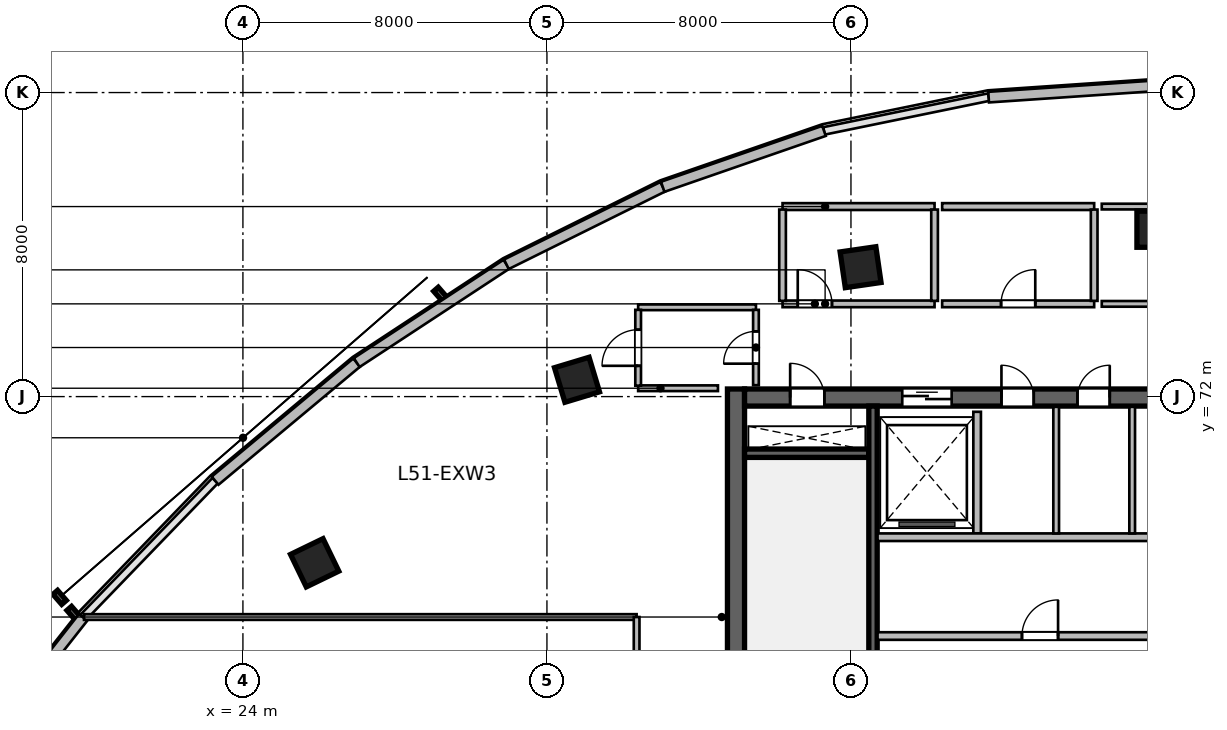
"""IFC4 building model, lengths in metres.
Left out: names, types, materials, properties, quantities, classifications, styles, units other than length and angle.
Written with IfcOpenShell. Run it as: python <this file> out.ifc"""

import sys

from ifc_helpers import new_model, si_unit, direction, frame, frame_2d, origin, origin_2d, place, context, subcontext, project, spatial, rectangle, extrude, source, transform, mapped, element, fill, save


model = new_model("IFC4")
c1 = context("Model", 3, precision=1e-05, world=origin(), true_north=direction((0.0, 1.0)))
c2 = subcontext(c1, "Body", "Model", "MODEL_VIEW")
j1 = project(units=[si_unit("LENGTHUNIT", "METRE"), si_unit("PLANEANGLEUNIT", "RADIAN")], contexts=[c1])
p1 = place(None, origin())
s1 = spatial("IfcSite", under=j1, at=p1, CompositionType="ELEMENT")
p2 = place(p1, origin())
s2 = spatial("IfcBuilding", under=s1, at=p2, CompositionType="ELEMENT")
p3 = place(p2, frame((0.0, 0.0, 211.8)))
s3 = spatial("IfcBuildingStorey", under=s2, at=p3, CompositionType="ELEMENT", Elevation=211.8)
m1 = source(origin(), c2, "Body", "SweptSolid", [
    extrude(rectangle(XDim=12.0, YDim=0.45, at=frame_2d((6.0, 0.0))), origin(), (0.0, 0.0, 1.0), 3.9),
])
p4 = place(p3, frame((36.975, 60.2, 0.0), z_axis=(0.0, 0.0, 1.0), x_axis=(0.0, 1.0, 0.0)))
e1 = element("IfcWall", 1, at=p4, inside=s3, PredefinedType="SHEAR", context=c2, shape_type="MappedRepresentation", body=[
    mapped(m1, transform((0.0, 0.0, 0.0), scale=1.0)),
])
m2 = source(origin(), c2, "Body", "SweptSolid", [
    extrude(rectangle(XDim=21.6, YDim=0.45, at=frame_2d((10.8, 0.0))), origin(), (0.0, 0.0, 1.0), 3.9),
])
p5 = place(p3, frame((37.2, 71.975, 0.0), z_axis=(0.0, 0.0, 1.0), x_axis=(1.0, 0.0, 0.0)))
e2 = element("IfcWall", 2, at=p5, inside=s3, PredefinedType="SHEAR", context=c2, shape_type="MappedRepresentation", body=[
    mapped(m2, transform((0.0, 0.0, 0.0), scale=1.0)),
])
p6 = place(p5, frame((1.2, 0.0, 0.0)))
e3 = element("IfcOpeningElement", 3, at=p6, cuts=e2, PredefinedType="OPENING", context=c2, shape_type="SweptSolid", body=[
    extrude(rectangle(XDim=0.9, YDim=2.1, at=frame_2d((0.45, 1.05))), frame((0.0, 0.235, 0.0), z_axis=(0.0, -1.0, 0.0), x_axis=(1.0, 0.0, 0.0)), (0.0, 0.0, 1.0), 0.47),
])
p7 = place(p5, frame((14.7, 0.0, 0.0)))
e4 = element("IfcOpeningElement", 4, at=p7, cuts=e2, PredefinedType="OPENING", context=c2, shape_type="SweptSolid", body=[
    extrude(rectangle(XDim=1.2, YDim=2.15, at=frame_2d((0.6, 1.075))), frame((0.0, 0.235, 0.0), z_axis=(0.0, -1.0, 0.0), x_axis=(1.0, 0.0, 0.0)), (0.0, 0.0, 1.0), 0.47),
])
p8 = place(p5, frame((4.15, 0.0, 0.0)))
e5 = element("IfcOpeningElement", 5, at=p8, cuts=e2, PredefinedType="OPENING", context=c2, shape_type="SweptSolid", body=[
    extrude(rectangle(XDim=1.3, YDim=2.15, at=frame_2d((0.65, 1.075))), frame((0.0, 0.235, 0.0), z_axis=(0.0, -1.0, 0.0), x_axis=(1.0, 0.0, 0.0)), (0.0, 0.0, 1.0), 0.47),
])
p9 = place(p5, frame((6.76, 0.0, 0.0)))
e6 = element("IfcOpeningElement", 6, at=p9, cuts=e2, PredefinedType="OPENING", context=c2, shape_type="SweptSolid", body=[
    extrude(rectangle(XDim=0.85, YDim=2.1, at=frame_2d((0.425, 1.05))), frame((0.0, 0.235, 0.0), z_axis=(0.0, -1.0, 0.0), x_axis=(1.0, 0.0, 0.0)), (0.0, 0.0, 1.0), 0.47),
])
p10 = place(p5, frame((8.76, 0.0, 0.0)))
e7 = element("IfcOpeningElement", 7, at=p10, cuts=e2, PredefinedType="OPENING", context=c2, shape_type="SweptSolid", body=[
    extrude(rectangle(XDim=0.85, YDim=2.1, at=frame_2d((0.425, 1.05))), frame((0.0, 0.235, 0.0), z_axis=(0.0, -1.0, 0.0), x_axis=(1.0, 0.0, 0.0)), (0.0, 0.0, 1.0), 0.47),
])
p11 = place(p5, frame((10.725, 0.0, 0.0)))
e8 = element("IfcOpeningElement", 8, at=p11, cuts=e2, PredefinedType="OPENING", context=c2, shape_type="SweptSolid", body=[
    extrude(rectangle(XDim=0.85, YDim=2.1, at=frame_2d((0.425, 1.05))), frame((0.0, 0.235, 0.0), z_axis=(0.0, -1.0, 0.0), x_axis=(1.0, 0.0, 0.0)), (0.0, 0.0, 1.0), 0.47),
])
m3 = source(origin(), c2, "Body", "SweptSolid", [
    extrude(rectangle(XDim=3.27, YDim=0.22, at=frame_2d((1.635, 0.0))), origin(), (0.0, 0.0, 1.0), 3.9),
])
p12 = place(p3, frame((37.2, 70.51, 0.0), z_axis=(0.0, 0.0, 1.0), x_axis=(1.0, 0.0, 0.0)))
e9 = element("IfcWall", 9, at=p12, inside=s3, PredefinedType="SHEAR", context=c2, shape_type="MappedRepresentation", body=[
    mapped(m3, transform((0.0, 0.0, 0.0), scale=1.0)),
])
m4 = source(origin(), c2, "Body", "SweptSolid", [
    extrude(rectangle(XDim=11.1, YDim=0.22, at=frame_2d((5.55, 0.0))), origin(), (0.0, 0.0, 1.0), 3.9),
])
p13 = place(p3, frame((40.58, 60.65, 0.0), z_axis=(0.0, 0.0, 1.0), x_axis=(0.0, 1.0, 0.0)))
e10 = element("IfcWall", 10, at=p13, inside=s3, PredefinedType="SHEAR", context=c2, shape_type="MappedRepresentation", body=[
    mapped(m4, transform((0.0, 0.0, 0.0), scale=1.0)),
])
m5 = source(origin(), c2, "Body", "SweptSolid", [
    extrude(rectangle(XDim=0.95, YDim=0.95, at=origin_2d()), origin(), (0.0, 0.0, 1.0), 3.9),
])
for number, where, z_axis, x_axis in (
    (11, (25.888, 67.627, 0.0), (0.0, 0.0, 1.0), (-0.436, 0.9, 0.0)),
    (12, (32.791, 72.442, 0.0), (0.0, 0.0, 1.0), (-0.289, 0.957, 0.0)),
    (13, (40.253, 75.404, 0.0), (0.0, 0.0, 1.0), (-0.143, 0.99, 0.0)),
    (14, (48.0, 76.404, 0.0), (0.0, 0.0, 1.0), (0.0, 1.0, 0.0)),
):
    element("IfcColumn", number, at=place(p3, frame(where, z_axis=z_axis, x_axis=x_axis)), inside=s3, PredefinedType="COLUMN", context=c2, shape_type="MappedRepresentation", body=[
        mapped(m5, transform((0.0, 0.0, 0.0), scale=1.0)),
    ])
m6 = source(origin(), c2, "Body", "SweptSolid", [
    extrude(rectangle(XDim=5.153, YDim=0.28, at=frame_2d((2.577, 0.0))), origin(), (0.0, 0.0, 1.0), 3.64),
])
p14 = place(p3, frame((16.609, 62.14, 0.0), z_axis=(0.0, 0.0, 1.0), x_axis=(0.618179283891, 0.786037132054, 0.0)))
e15 = element("IfcWall", 15, at=p14, inside=s3, PredefinedType="SOLIDWALL", context=c2, shape_type="MappedRepresentation", body=[
    mapped(m6, transform((0.0, 0.0, 0.0), scale=1.0)),
])
m7 = source(origin(), c2, "Body", "SweptSolid", [
    extrude(rectangle(XDim=4.852, YDim=0.28, at=frame_2d((2.426, 0.0))), origin(), (0.0, 0.0, 1.0), 3.64),
])
p15 = place(p3, frame((23.268, 69.788, 0.0), z_axis=(0.0, 0.0, 1.0), x_axis=(0.767936605821, 0.640525853843, 0.0)))
e16 = element("IfcWall", 16, at=p15, inside=s3, PredefinedType="SOLIDWALL", context=c2, shape_type="MappedRepresentation", body=[
    mapped(m7, transform((0.0, 0.0, 0.0), scale=1.0)),
])
m8 = source(origin(), c2, "Body", "SweptSolid", [
    extrude(rectangle(XDim=4.713, YDim=0.28, at=frame_2d((2.356, 0.0))), origin(), (0.0, 0.0, 1.0), 3.64),
])
p16 = place(p3, frame((26.994, 72.896, 0.0), z_axis=(0.0, 0.0, 1.0), x_axis=(0.835974386457, 0.548768462275, 0.0)))
e17 = element("IfcWall", 17, at=p16, inside=s3, PredefinedType="SOLIDWALL", context=c2, shape_type="MappedRepresentation", body=[
    mapped(m8, transform((0.0, 0.0, 0.0), scale=1.0)),
])
m9 = source(origin(), c2, "Body", "SweptSolid", [
    extrude(rectangle(XDim=4.59, YDim=0.28, at=frame_2d((2.295, 0.0))), origin(), (0.0, 0.0, 1.0), 3.64),
])
p17 = place(p3, frame((30.934, 75.482, 0.0), z_axis=(0.0, 0.0, 1.0), x_axis=(0.895974834987, 0.444104824418, 0.0)))
e18 = element("IfcWall", 18, at=p17, inside=s3, PredefinedType="SOLIDWALL", context=c2, shape_type="MappedRepresentation", body=[
    mapped(m9, transform((0.0, 0.0, 0.0), scale=1.0)),
])
m10 = source(origin(), c2, "Body", "SweptSolid", [
    extrude(rectangle(XDim=4.492, YDim=0.28, at=frame_2d((2.246, 0.0))), origin(), (0.0, 0.0, 1.0), 3.64),
])
p18 = place(p3, frame((35.046, 77.52, 0.0), z_axis=(0.0, 0.0, 1.0), x_axis=(0.944872297412, 0.32743906545, 0.0)))
e19 = element("IfcWall", 19, at=p18, inside=s3, PredefinedType="SOLIDWALL", context=c2, shape_type="MappedRepresentation", body=[
    mapped(m10, transform((0.0, 0.0, 0.0), scale=1.0)),
])
m11 = source(origin(), c2, "Body", "SweptSolid", [
    extrude(rectangle(XDim=4.387, YDim=0.28, at=frame_2d((2.193, 0.0))), origin(), (0.0, 0.0, 1.0), 3.64),
])
p19 = place(p3, frame((43.623, 79.879, 0.0), z_axis=(0.0, 0.0, 1.0), x_axis=(0.997703650546, 0.06773053733, 0.0)))
e20 = element("IfcWall", 20, at=p19, inside=s3, PredefinedType="SOLIDWALL", context=c2, shape_type="MappedRepresentation", body=[
    mapped(m11, transform((0.0, 0.0, 0.0), scale=1.0)),
])
m12 = source(origin(), c2, "Body", "SweptSolid", [
    extrude(rectangle(XDim=3.2, YDim=0.2, at=frame_2d((1.6, 0.0))), origin(), (0.0, 0.0, 1.0), 3.64),
])
p20 = place(p3, frame((43.32, 68.4, 0.0), z_axis=(0.0, 0.0, 1.0), x_axis=(0.0, 1.0, 0.0)))
e21 = element("IfcWall", 21, at=p20, inside=s3, PredefinedType="SOLIDWALL", context=c2, shape_type="MappedRepresentation", body=[
    mapped(m12, transform((0.0, 0.0, 0.0), scale=1.0)),
])
m13 = source(origin(), c2, "Body", "SweptSolid", [
    extrude(rectangle(XDim=8.8, YDim=0.2, at=frame_2d((4.4, 0.0))), origin(), (0.0, 0.0, 1.0), 3.64),
])
p21 = place(p3, frame((40.7, 68.3, 0.0), z_axis=(0.0, 0.0, 1.0), x_axis=(1.0, 0.0, 0.0)))
e22 = element("IfcWall", 22, at=p21, inside=s3, PredefinedType="SOLIDWALL", context=c2, shape_type="MappedRepresentation", body=[
    mapped(m13, transform((0.0, 0.0, 0.0), scale=1.0)),
])
m14 = source(origin(), c2, "Body", "SweptSolid", [
    extrude(rectangle(XDim=3.33, YDim=0.15, at=frame_2d((1.665, 0.0))), origin(), (0.0, 0.0, 1.0), 3.64),
])
for number, where, z_axis, x_axis in (
    (23, (45.4, 68.4, 0.0), (0.0, 0.0, 1.0), (0.0, 1.0, 0.0)),
    (24, (47.4, 68.4, 0.0), (0.0, 0.0, 1.0), (0.0, 1.0, 0.0)),
):
    element("IfcWall", number, at=place(p3, frame(where, z_axis=z_axis, x_axis=x_axis)), inside=s3, PredefinedType="PARTITIONING", context=c2, shape_type="MappedRepresentation", body=[
        mapped(m14, transform((0.0, 0.0, 0.0), scale=1.0)),
    ])
p22 = place(p3, frame((40.7, 65.7, 0.0), z_axis=(0.0, 0.0, 1.0), x_axis=(1.0, 0.0, 0.0)))
e25 = element("IfcWall", 25, at=p22, inside=s3, PredefinedType="SOLIDWALL", context=c2, shape_type="MappedRepresentation", body=[
    mapped(m13, transform((0.0, 0.0, 0.0), scale=1.0)),
])
p23 = place(p22, frame((3.8, 0.0, 0.0)))
e26 = element("IfcOpeningElement", 26, at=p23, cuts=e25, PredefinedType="OPENING", context=c2, shape_type="SweptSolid", body=[
    extrude(rectangle(XDim=0.95, YDim=2.15, at=frame_2d((0.475, 1.075))), frame((0.0, 0.11, 0.0), z_axis=(0.0, -1.0, 0.0), x_axis=(1.0, 0.0, 0.0)), (0.0, 0.0, 1.0), 0.22),
])
m15 = source(origin(), c2, "Body", "SweptSolid", [
    extrude(rectangle(XDim=2.1, YDim=0.15, at=frame_2d((1.05, 0.0))), origin(), (0.0, 0.0, 1.0), 3.64),
])
p24 = place(p3, frame((34.4, 72.22, 0.0), z_axis=(0.0, 0.0, 1.0), x_axis=(1.0, 0.0, 0.0)))
e27 = element("IfcWall", 27, at=p24, inside=s3, PredefinedType="PARTITIONING", context=c2, shape_type="MappedRepresentation", body=[
    mapped(m15, transform((0.0, 0.0, 0.0), scale=1.0)),
])
m16 = source(origin(), c2, "Body", "SweptSolid", [
    extrude(rectangle(XDim=3.1, YDim=0.15, at=frame_2d((1.55, 0.0))), origin(), (0.0, 0.0, 1.0), 3.071),
])
p25 = place(p3, frame((34.4, 74.35, 0.0), z_axis=(0.0, 0.0, 1.0), x_axis=(1.0, 0.0, 0.0)))
e28 = element("IfcWall", 28, at=p25, inside=s3, PredefinedType="PARTITIONING", context=c2, shape_type="MappedRepresentation", body=[
    mapped(m16, transform((0.0, 0.0, 0.0), scale=1.0)),
])
m17 = source(origin(), c2, "Body", "SweptSolid", [
    extrude(rectangle(XDim=1.995, YDim=0.15, at=frame_2d((0.998, 0.0))), origin(), (0.0, 0.0, 1.0), 3.64),
])
p26 = place(p3, frame((34.4, 72.288, 0.0), z_axis=(0.0, 0.0, 1.0), x_axis=(0.0, 1.0, 0.0)))
e29 = element("IfcWall", 29, at=p26, inside=s3, PredefinedType="PARTITIONING", context=c2, shape_type="MappedRepresentation", body=[
    mapped(m17, transform((0.0, 0.0, 0.0), scale=1.0)),
])
p27 = place(p26, frame((0.522, 0.0, 0.0)))
e30 = element("IfcOpeningElement", 30, at=p27, cuts=e29, PredefinedType="OPENING", context=c2, shape_type="SweptSolid", body=[
    extrude(rectangle(XDim=0.95, YDim=2.1, at=frame_2d((0.475, 1.05))), frame((0.0, 0.085, 0.0), z_axis=(0.0, -1.0, 0.0), x_axis=(1.0, 0.0, 0.0)), (0.0, 0.0, 1.0), 0.17),
])
m18 = source(origin(), c2, "Body", "SweptSolid", [
    extrude(rectangle(XDim=1.982, YDim=0.15, at=frame_2d((0.991, 0.0))), origin(), (0.0, 0.0, 1.0), 3.64),
])
p28 = place(p3, frame((37.5, 72.3, 0.0), z_axis=(0.0, 0.0, 1.0), x_axis=(0.0, 1.0, 0.0)))
e31 = element("IfcWall", 31, at=p28, inside=s3, PredefinedType="PARTITIONING", context=c2, shape_type="MappedRepresentation", body=[
    mapped(m18, transform((0.0, 0.0, 0.0), scale=1.0)),
])
p29 = place(p28, frame((0.566, 0.0, 0.0)))
e32 = element("IfcOpeningElement", 32, at=p29, cuts=e31, PredefinedType="OPENING", context=c2, shape_type="SweptSolid", body=[
    extrude(rectangle(XDim=0.85, YDim=2.1, at=frame_2d((0.425, 1.05))), frame((0.0, 0.085, 0.0), z_axis=(0.0, -1.0, 0.0), x_axis=(1.0, 0.0, 0.0)), (0.0, 0.0, 1.0), 0.17),
])
m19 = source(origin(), c2, "Body", "SweptSolid", [
    extrude(rectangle(XDim=4.0, YDim=0.175, at=frame_2d((2.0, 0.0))), origin(), (0.0, 0.0, 1.0), 3.64),
])
p30 = place(p3, frame((38.2, 74.44, 0.0), z_axis=(0.0, 0.0, 1.0), x_axis=(1.0, 0.0, 0.0)))
e33 = element("IfcWall", 33, at=p30, inside=s3, PredefinedType="PARTITIONING", context=c2, shape_type="MappedRepresentation", body=[
    mapped(m19, transform((0.0, 0.0, 0.0), scale=1.0)),
])
p31 = place(p30, frame((0.4, 0.0, 0.0)))
e34 = element("IfcOpeningElement", 34, at=p31, cuts=e33, PredefinedType="OPENING", context=c2, shape_type="SweptSolid", body=[
    extrude(rectangle(XDim=0.9, YDim=2.08, at=frame_2d((0.45, 1.04))), frame((0.0, 0.098, 0.0), z_axis=(0.0, -1.0, 0.0), x_axis=(1.0, 0.0, 0.0)), (0.0, 0.0, 1.0), 0.195),
])
m20 = source(origin(), c2, "Body", "SweptSolid", [
    extrude(rectangle(XDim=4.0, YDim=0.18, at=frame_2d((2.0, 0.0))), origin(), (0.0, 0.0, 1.0), 3.64),
])
p32 = place(p3, frame((38.2, 77.0, 0.0), z_axis=(0.0, 0.0, 1.0), x_axis=(1.0, 0.0, 0.0)))
e35 = element("IfcWall", 35, at=p32, inside=s3, PredefinedType="PLUMBINGWALL", context=c2, shape_type="MappedRepresentation", body=[
    mapped(m20, transform((0.0, 0.0, 0.0), scale=1.0)),
])
m21 = source(origin(), c2, "Body", "SweptSolid", [
    extrude(rectangle(XDim=2.403, YDim=0.175, at=frame_2d((1.201, 0.0))), origin(), (0.0, 0.0, 1.0), 3.64),
])
for number, where, z_axis, x_axis in (
    (36, (38.2, 74.519, 0.0), (0.0, 0.0, 1.0), (0.0, 1.0, 0.0)),
    (37, (42.2, 74.519, 0.0), (0.0, 0.0, 1.0), (0.0, 1.0, 0.0)),
):
    element("IfcWall", number, at=place(p3, frame(where, z_axis=z_axis, x_axis=x_axis)), inside=s3, PredefinedType="PARTITIONING", context=c2, shape_type="MappedRepresentation", body=[
        mapped(m21, transform((0.0, 0.0, 0.0), scale=1.0)),
    ])
p33 = place(p3, frame((42.4, 74.44, 0.0), z_axis=(0.0, 0.0, 1.0), x_axis=(1.0, 0.0, 0.0)))
e38 = element("IfcWall", 38, at=p33, inside=s3, PredefinedType="PARTITIONING", context=c2, shape_type="MappedRepresentation", body=[
    mapped(m19, transform((0.0, 0.0, 0.0), scale=1.0)),
])
p34 = place(p33, frame((1.55, 0.0, 0.0)))
e39 = element("IfcOpeningElement", 39, at=p34, cuts=e38, PredefinedType="OPENING", context=c2, shape_type="SweptSolid", body=[
    extrude(rectangle(XDim=0.9, YDim=2.08, at=frame_2d((0.45, 1.04))), frame((0.0, 0.098, 0.0), z_axis=(0.0, -1.0, 0.0), x_axis=(1.0, 0.0, 0.0)), (0.0, 0.0, 1.0), 0.195),
])
p35 = place(p3, frame((42.4, 77.0, 0.0), z_axis=(0.0, 0.0, 1.0), x_axis=(1.0, 0.0, 0.0)))
e40 = element("IfcWall", 40, at=p35, inside=s3, PredefinedType="PLUMBINGWALL", context=c2, shape_type="MappedRepresentation", body=[
    mapped(m20, transform((0.0, 0.0, 0.0), scale=1.0)),
])
p36 = place(p3, frame((46.4, 74.519, 0.0), z_axis=(0.0, 0.0, 1.0), x_axis=(0.0, 1.0, 0.0)))
e41 = element("IfcWall", 41, at=p36, inside=s3, PredefinedType="PARTITIONING", context=c2, shape_type="MappedRepresentation", body=[
    mapped(m21, transform((0.0, 0.0, 0.0), scale=1.0)),
])
m22 = source(origin(), c2, "Body", "SweptSolid", [
    extrude(rectangle(XDim=4.4, YDim=0.15, at=frame_2d((2.2, 0.0))), origin(), (0.0, 0.0, 1.0), 3.64),
])
p37 = place(p3, frame((46.6, 74.44, 0.0), z_axis=(0.0, 0.0, 1.0), x_axis=(1.0, 0.0, 0.0)))
e42 = element("IfcWall", 42, at=p37, inside=s3, PredefinedType="PARTITIONING", context=c2, shape_type="MappedRepresentation", body=[
    mapped(m22, transform((0.0, 0.0, 0.0), scale=1.0)),
])
p38 = place(p37, frame((1.725, 0.0, 0.0)))
e43 = element("IfcOpeningElement", 43, at=p38, cuts=e42, PredefinedType="OPENING", context=c2, shape_type="SweptSolid", body=[
    extrude(rectangle(XDim=0.95, YDim=2.1, at=frame_2d((0.475, 1.05))), frame((0.0, 0.085, 0.0), z_axis=(0.0, -1.0, 0.0), x_axis=(1.0, 0.0, 0.0)), (0.0, 0.0, 1.0), 0.17),
])
p39 = place(p3, frame((46.6, 77.0, 0.0), z_axis=(0.0, 0.0, 1.0), x_axis=(1.0, 0.0, 0.0)))
e44 = element("IfcWall", 44, at=p39, inside=s3, PredefinedType="PARTITIONING", context=c2, shape_type="MappedRepresentation", body=[
    mapped(m22, transform((0.0, 0.0, 0.0), scale=1.0)),
])
m23 = source(origin(), c2, "Body", "SweptSolid", [
    extrude(rectangle(XDim=14.542, YDim=0.15, at=frame_2d((7.271, 0.0))), origin(), (0.0, 0.0, 1.0), 3.64),
])
p40 = place(p3, frame((19.818, 66.2, 0.0), z_axis=(0.0, 0.0, 1.0), x_axis=(1.0, 0.0, 0.0)))
e45 = element("IfcWall", 45, at=p40, inside=s3, PredefinedType="PARTITIONING", context=c2, shape_type="MappedRepresentation", body=[
    mapped(m23, transform((0.0, 0.0, 0.0), scale=1.0)),
])
m24 = source(origin(), c2, "Body", "SweptSolid", [
    extrude(rectangle(XDim=4.7, YDim=0.15, at=frame_2d((2.35, 0.0))), origin(), (0.0, 0.0, 1.0), 3.64),
])
p41 = place(p3, frame((34.36, 61.5, 0.0), z_axis=(0.0, 0.0, 1.0), x_axis=(0.0, 1.0, 0.0)))
e46 = element("IfcWall", 46, at=p41, inside=s3, PredefinedType="PARTITIONING", context=c2, shape_type="MappedRepresentation", body=[
    mapped(m24, transform((0.0, 0.0, 0.0), scale=1.0)),
])
p42 = place(p41, frame((1.875, 0.0, 0.0)))
e47 = element("IfcOpeningElement", 47, at=p42, cuts=e46, PredefinedType="OPENING", context=c2, shape_type="SweptSolid", body=[
    extrude(rectangle(XDim=0.95, YDim=2.1, at=frame_2d((0.475, 1.05))), frame((0.0, 0.085, 0.0), z_axis=(0.0, -1.0, 0.0), x_axis=(1.0, 0.0, 0.0)), (0.0, 0.0, 1.0), 0.17),
])
m25 = source(origin(), c2, "Body", "SweptSolid", [
    extrude(rectangle(XDim=0.9, YDim=2.1, at=frame_2d((0.45, 1.05))), frame((0.0, 0.025, 0.0), z_axis=(0.0, -1.0, 0.0), x_axis=(1.0, 0.0, 0.0)), (0.0, 0.0, 1.0), 0.05),
])
p43 = place(p6, origin())
e48 = element("IfcDoor", 48, at=p43, inside=s3, OperationType="SINGLE_SWING_LEFT", PredefinedType="DOOR", context=c2, shape_type="MappedRepresentation", body=[
    mapped(m25, transform((0.0, 0.0, 0.0), scale=1.0)),
])
fill(e3, e48)
m26 = source(origin(), c2, "Body", "SweptSolid", [
    extrude(rectangle(XDim=1.3, YDim=2.15, at=frame_2d((0.65, 1.075))), frame((0.0, 0.025, 0.0), z_axis=(0.0, -1.0, 0.0), x_axis=(1.0, 0.0, 0.0)), (0.0, 0.0, 1.0), 0.05),
])
p44 = place(p8, origin())
e49 = element("IfcDoor", 49, at=p44, inside=s3, OperationType="DOUBLE_DOOR_SLIDING", PredefinedType="DOOR", context=c2, shape_type="MappedRepresentation", body=[
    mapped(m26, transform((0.0, 0.0, 0.0), scale=1.0)),
])
fill(e5, e49)
m27 = source(origin(), c2, "Body", "SweptSolid", [
    extrude(rectangle(XDim=0.85, YDim=2.1, at=frame_2d((0.425, 1.05))), frame((0.0, 0.025, 0.0), z_axis=(0.0, -1.0, 0.0), x_axis=(1.0, 0.0, 0.0)), (0.0, 0.0, 1.0), 0.05),
])
p45 = place(p9, origin())
e50 = element("IfcDoor", 50, at=p45, inside=s3, OperationType="SINGLE_SWING_LEFT", PredefinedType="DOOR", context=c2, shape_type="MappedRepresentation", body=[
    mapped(m27, transform((0.0, 0.0, 0.0), scale=1.0)),
])
fill(e6, e50)
p46 = place(p10, origin())
e51 = element("IfcDoor", 51, at=p46, inside=s3, OperationType="SINGLE_SWING_RIGHT", PredefinedType="DOOR", context=c2, shape_type="MappedRepresentation", body=[
    mapped(m27, transform((0.0, 0.0, 0.0), scale=1.0)),
])
fill(e7, e51)
m28 = source(origin(), c2, "Body", "SweptSolid", [
    extrude(rectangle(XDim=0.95, YDim=2.15, at=frame_2d((0.475, 1.075))), frame((0.0, 0.025, 0.0), z_axis=(0.0, -1.0, 0.0), x_axis=(1.0, 0.0, 0.0)), (0.0, 0.0, 1.0), 0.05),
])
p47 = place(p23, origin())
e52 = element("IfcDoor", 52, at=p47, inside=s3, OperationType="SINGLE_SWING_RIGHT", PredefinedType="DOOR", context=c2, shape_type="MappedRepresentation", body=[
    mapped(m28, transform((0.0, 0.0, 0.0), scale=1.0)),
])
fill(e26, e52)
p48 = place(p29, origin())
e53 = element("IfcDoor", 53, at=p48, inside=s3, OperationType="SINGLE_SWING_LEFT", PredefinedType="DOOR", context=c2, shape_type="MappedRepresentation", body=[
    mapped(m27, transform((0.0, 0.0, 0.0), scale=1.0)),
])
fill(e32, e53)
m29 = source(origin(), c2, "Body", "SweptSolid", [
    extrude(rectangle(XDim=0.9, YDim=2.08, at=frame_2d((0.45, 1.04))), frame((0.0, 0.025, 0.0), z_axis=(0.0, -1.0, 0.0), x_axis=(1.0, 0.0, 0.0)), (0.0, 0.0, 1.0), 0.05),
])
p49 = place(p31, origin())
e54 = element("IfcDoor", 54, at=p49, inside=s3, OperationType="SINGLE_SWING_LEFT", PredefinedType="DOOR", context=c2, shape_type="MappedRepresentation", body=[
    mapped(m29, transform((0.0, 0.0, 0.0), scale=1.0)),
])
fill(e34, e54)
p50 = place(p34, origin())
e55 = element("IfcDoor", 55, at=p50, inside=s3, OperationType="SINGLE_SWING_RIGHT", PredefinedType="DOOR", context=c2, shape_type="MappedRepresentation", body=[
    mapped(m29, transform((0.0, 0.0, 0.0), scale=1.0)),
])
fill(e39, e55)
m30 = source(origin(), c2, "Body", "SweptSolid", [
    extrude(rectangle(XDim=0.95, YDim=2.1, at=frame_2d((0.475, 1.05))), frame((0.0, 0.025, 0.0), z_axis=(0.0, -1.0, 0.0), x_axis=(1.0, 0.0, 0.0)), (0.0, 0.0, 1.0), 0.05),
])
p51 = place(p27, origin())
e56 = element("IfcDoor", 56, at=p51, inside=s3, OperationType="SINGLE_SWING_LEFT", PredefinedType="DOOR", context=c2, shape_type="MappedRepresentation", body=[
    mapped(m30, transform((0.0, 0.0, 0.0), scale=1.0)),
])
fill(e30, e56)
save(model, sys.argv[1])
